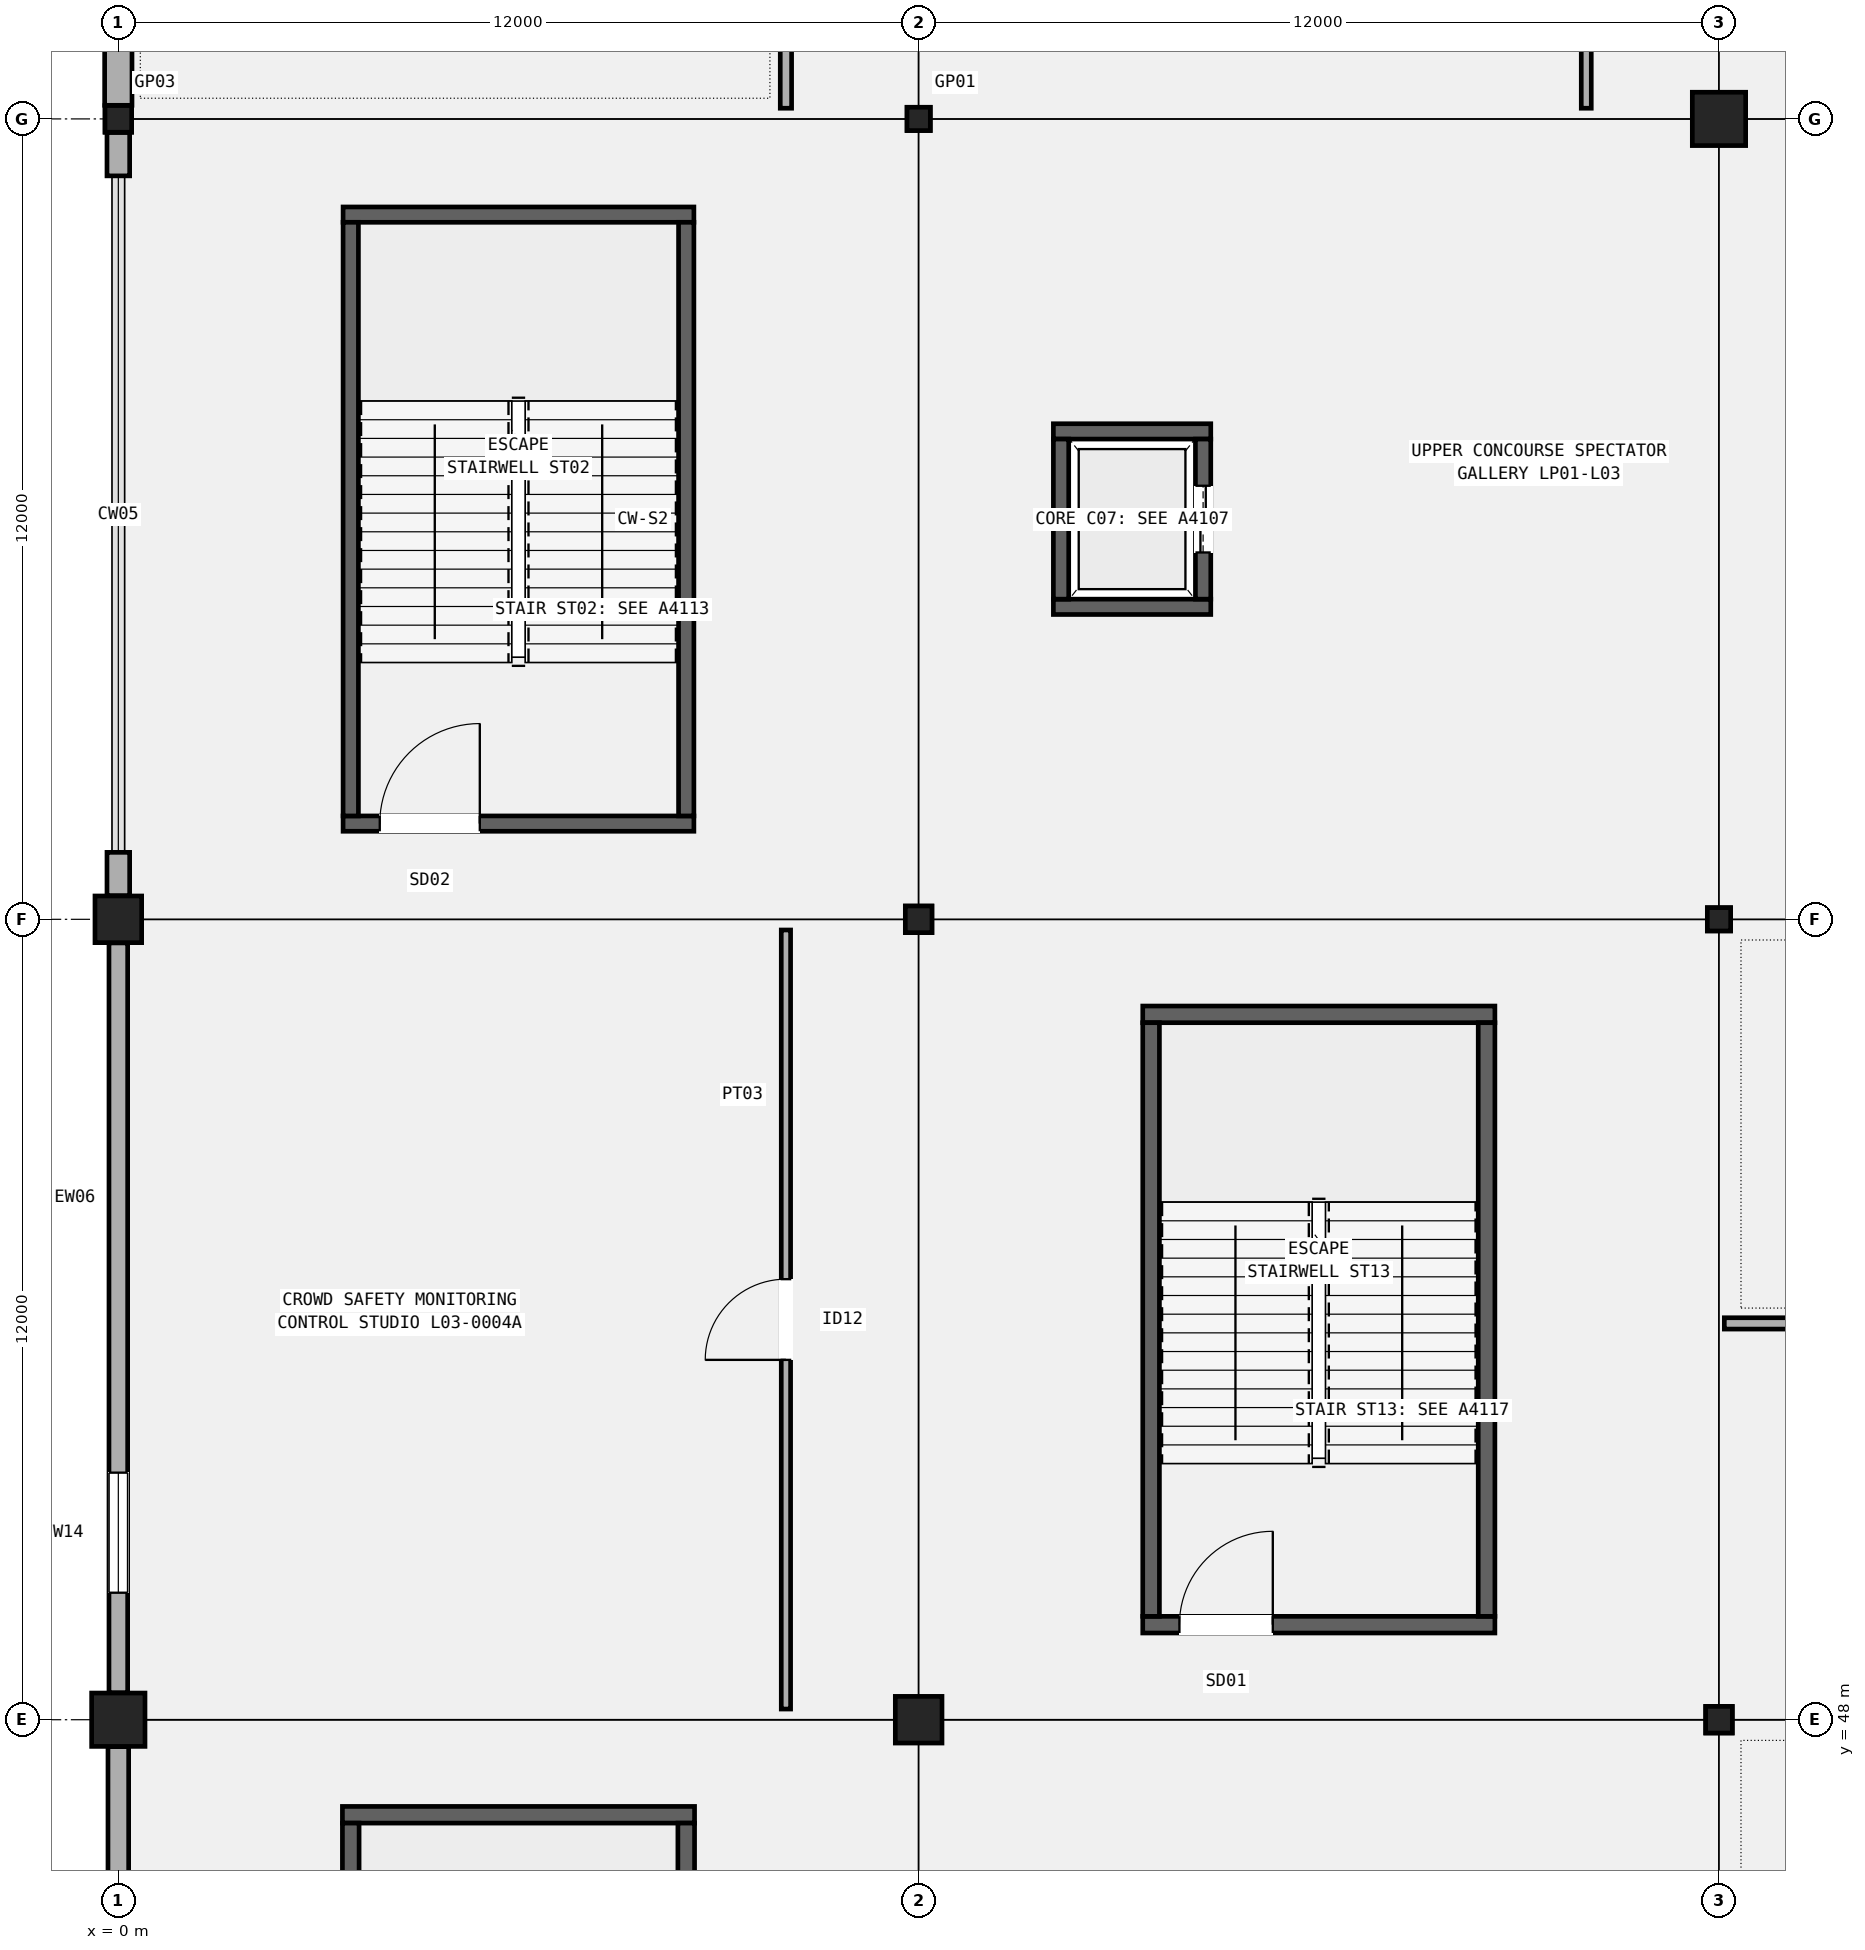
"""IFC4 building model, lengths in metres.
Left out: names, types, materials, properties, quantities, classifications, styles, units other than length and angle.
Written with IfcOpenShell. Run it as: python <this file> out.ifc"""

import sys

from ifc_helpers import new_model, si_unit, direction, frame, frame_2d, origin, origin_2d, place, context, subcontext, project, spatial, rectangle, hollow_rectangle, extrude, element, fill, save


model = new_model("IFC4")
c1 = context("Model", 3, precision=1e-05, world=origin(), true_north=direction((0.0, 1.0)))
c2 = subcontext(c1, "Body", "Model", "MODEL_VIEW")
j1 = project(units=[si_unit("LENGTHUNIT", "METRE"), si_unit("PLANEANGLEUNIT", "RADIAN")], contexts=[c1])
p1 = place(None, origin())
s1 = spatial("IfcSite", under=j1, at=p1, CompositionType="ELEMENT")
p2 = place(p1, origin())
s2 = spatial("IfcBuilding", under=s1, at=p2, CompositionType="ELEMENT")
p3 = place(p2, frame((0.0, 0.0, 15.3)))
s3 = spatial("IfcBuildingStorey", under=s2, at=p3, CompositionType="ELEMENT", Elevation=15.3)
p4 = place(p3, frame((0.0, 48.0, 0.0), z_axis=(0.0, 0.0, 1.0), x_axis=(1.0, 0.0, 0.0)))
e1 = element("IfcColumn", 1, at=p4, inside=s3, PredefinedType="COLUMN", context=c2, shape_type="SweptSolid", body=[
    extrude(rectangle(XDim=0.8, YDim=0.8, at=origin_2d()), origin(), (0.0, 0.0, 1.0), 5.1),
])
p5 = place(p3, frame((0.0, 60.0, 0.0), z_axis=(0.0, 0.0, 1.0), x_axis=(1.0, 0.0, 0.0)))
e2 = element("IfcColumn", 2, at=p5, inside=s3, PredefinedType="COLUMN", context=c2, shape_type="SweptSolid", body=[
    extrude(rectangle(XDim=0.7, YDim=0.7, at=origin_2d()), origin(), (0.0, 0.0, 1.0), 5.1),
])
p6 = place(p3, frame((0.0, 72.0, 0.0), z_axis=(0.0, 0.0, 1.0), x_axis=(1.0, 0.0, 0.0)))
e3 = element("IfcColumn", 3, at=p6, inside=s3, PredefinedType="COLUMN", context=c2, shape_type="SweptSolid", body=[
    extrude(hollow_rectangle(XDim=0.4, YDim=0.4, WallThickness=0.016, InnerFilletRadius=0.016, OuterFilletRadius=0.032, at=origin_2d()), origin(), (0.0, 0.0, 1.0), 5.1),
])
p7 = place(p3, frame((12.0, 48.0, 0.0), z_axis=(0.0, 0.0, 1.0), x_axis=(1.0, 0.0, 0.0)))
e4 = element("IfcColumn", 4, at=p7, inside=s3, PredefinedType="COLUMN", context=c2, shape_type="SweptSolid", body=[
    extrude(rectangle(XDim=0.7, YDim=0.7, at=origin_2d()), origin(), (0.0, 0.0, 1.0), 5.1),
])
p8 = place(p3, frame((12.0, 60.0, 0.0), z_axis=(0.0, 0.0, 1.0), x_axis=(1.0, 0.0, 0.0)))
e5 = element("IfcColumn", 5, at=p8, inside=s3, PredefinedType="COLUMN", context=c2, shape_type="SweptSolid", body=[
    extrude(hollow_rectangle(XDim=0.4, YDim=0.4, WallThickness=0.016, InnerFilletRadius=0.016, OuterFilletRadius=0.032, at=origin_2d()), origin(), (0.0, 0.0, 1.0), 5.1),
])
p9 = place(p3, frame((12.0, 72.0, 0.0), z_axis=(0.0, 0.0, 1.0), x_axis=(1.0, 0.0, 0.0)))
e6 = element("IfcColumn", 6, at=p9, inside=s3, PredefinedType="COLUMN", context=c2, shape_type="SweptSolid", body=[
    extrude(hollow_rectangle(XDim=0.35, YDim=0.35, WallThickness=0.016, InnerFilletRadius=0.016, OuterFilletRadius=0.032, at=origin_2d()), origin(), (0.0, 0.0, 1.0), 5.1),
])
p10 = place(p3, frame((24.0, 48.0, 0.0), z_axis=(0.0, 0.0, 1.0), x_axis=(1.0, 0.0, 0.0)))
e7 = element("IfcColumn", 7, at=p10, inside=s3, PredefinedType="COLUMN", context=c2, shape_type="SweptSolid", body=[
    extrude(hollow_rectangle(XDim=0.4, YDim=0.4, WallThickness=0.016, InnerFilletRadius=0.016, OuterFilletRadius=0.032, at=origin_2d()), origin(), (0.0, 0.0, 1.0), 5.1),
])
p11 = place(p3, frame((24.0, 60.0, 0.0), z_axis=(0.0, 0.0, 1.0), x_axis=(1.0, 0.0, 0.0)))
e8 = element("IfcColumn", 8, at=p11, inside=s3, PredefinedType="COLUMN", context=c2, shape_type="SweptSolid", body=[
    extrude(hollow_rectangle(XDim=0.35, YDim=0.35, WallThickness=0.016, InnerFilletRadius=0.016, OuterFilletRadius=0.032, at=origin_2d()), origin(), (0.0, 0.0, 1.0), 5.1),
])
p12 = place(p3, frame((24.0, 72.0, 0.0), z_axis=(0.0, 0.0, 1.0), x_axis=(1.0, 0.0, 0.0)))
e9 = element("IfcColumn", 9, at=p12, inside=s3, PredefinedType="COLUMN", context=c2, shape_type="SweptSolid", body=[
    extrude(rectangle(XDim=0.8, YDim=0.8, at=origin_2d()), origin(), (0.0, 0.0, 1.0), 5.1),
])
p13 = place(p3, frame((0.0, 36.179, 0.0), z_axis=(0.0, 0.0, 1.0), x_axis=(0.0, 1.0, 0.0)))
e10 = element("IfcWall", 10, at=p13, inside=s3, PredefinedType="SOLIDWALL", context=c2, shape_type="SweptSolid", body=[
    extrude(rectangle(XDim=11.417, YDim=0.31, at=frame_2d((5.708, 0.0))), origin(), (0.0, 0.0, 1.0), 4.06),
])
p14 = place(p13, frame((2.75, 0.0, 0.95)))
e11 = element("IfcOpeningElement", 11, at=p14, cuts=e10, PredefinedType="OPENING", context=c2, shape_type="SweptSolid", body=[
    extrude(rectangle(XDim=1.8, YDim=1.75, at=frame_2d((0.9, 0.875))), frame((0.0, 0.165, 0.0), z_axis=(0.0, -1.0, 0.0), x_axis=(1.0, 0.0, 0.0)), (0.0, 0.0, 1.0), 0.33),
])
p15 = place(p3, frame((0.0, 48.404, 0.0), z_axis=(0.0, 0.0, 1.0), x_axis=(0.0, 1.0, 0.0)))
e12 = element("IfcWall", 12, at=p15, inside=s3, PredefinedType="SOLIDWALL", context=c2, shape_type="SweptSolid", body=[
    extrude(rectangle(XDim=11.242, YDim=0.28, at=frame_2d((5.621, 0.0))), origin(), (0.0, 0.0, 1.0), 4.16),
])
p16 = place(p15, frame((1.5, 0.0, 0.95)))
e13 = element("IfcOpeningElement", 13, at=p16, cuts=e12, PredefinedType="OPENING", context=c2, shape_type="SweptSolid", body=[
    extrude(rectangle(XDim=1.8, YDim=2.15, at=frame_2d((0.9, 1.075))), frame((0.0, 0.15, 0.0), z_axis=(0.0, -1.0, 0.0), x_axis=(1.0, 0.0, 0.0)), (0.0, 0.0, 1.0), 0.3),
])
for number, where, z_axis, x_axis in (
    (14, (0.0, 60.354, 0.0), (0.0, 0.0, 1.0), (0.0, 1.0, 0.0)),
    (15, (0.0, 71.146, 0.0), (0.0, 0.0, 1.0), (0.0, 1.0, 0.0)),
):
    element("IfcWall", number, at=place(p3, frame(where, z_axis=z_axis, x_axis=x_axis)), inside=s3, PredefinedType="SOLIDWALL", context=c2, shape_type="SweptSolid", body=[
        extrude(rectangle(XDim=0.65, YDim=0.34, at=frame_2d((0.325, 0.0))), origin(), (0.0, 0.0, 1.0), 4.172),
    ])
p17 = place(p3, frame((0.0, 72.204, 0.0), z_axis=(0.0, 0.0, 1.0), x_axis=(0.0, 1.0, 0.0)))
e16 = element("IfcWall", 16, at=p17, inside=s3, PredefinedType="SOLIDWALL", context=c2, shape_type="SweptSolid", body=[
    extrude(rectangle(XDim=11.617, YDim=0.41, at=frame_2d((5.809, 0.0))), origin(), (0.0, 0.0, 1.0), 4.06),
])
p18 = place(p17, frame((6.368, 0.0, 0.95)))
e17 = element("IfcOpeningElement", 17, at=p18, cuts=e16, PredefinedType="OPENING", context=c2, shape_type="SweptSolid", body=[
    extrude(rectangle(XDim=1.8, YDim=2.55, at=frame_2d((0.9, 1.275))), frame((0.0, 0.215, 0.0), z_axis=(0.0, -1.0, 0.0), x_axis=(1.0, 0.0, 0.0)), (0.0, 0.0, 1.0), 0.43),
])
p19 = place(p3, frame((3.36, 46.575, 0.0), z_axis=(0.0, 0.0, 1.0), x_axis=(1.0, 0.0, 0.0)))
e18 = element("IfcWall", 18, at=p19, inside=s3, PredefinedType="SHEAR", context=c2, shape_type="SweptSolid", body=[
    extrude(rectangle(XDim=5.28, YDim=0.25, at=frame_2d((2.64, 0.0))), origin(), (0.0, 0.0, 1.0), 4.86),
])
for number, where, z_axis, x_axis in (
    (19, (3.485, 37.55, 0.0), (0.0, 0.0, 1.0), (0.0, 1.0, 0.0)),
    (20, (8.515, 37.55, 0.0), (0.0, 0.0, 1.0), (0.0, 1.0, 0.0)),
):
    element("IfcWall", number, at=place(p3, frame(where, z_axis=z_axis, x_axis=x_axis)), inside=s3, PredefinedType="SHEAR", context=c2, shape_type="SweptSolid", body=[
        extrude(rectangle(XDim=8.9, YDim=0.25, at=frame_2d((4.45, 0.0))), origin(), (0.0, 0.0, 1.0), 4.86),
    ])
p20 = place(p3, frame((3.37, 61.435, 0.0), z_axis=(0.0, 0.0, 1.0), x_axis=(1.0, 0.0, 0.0)))
e21 = element("IfcWall", 21, at=p20, inside=s3, PredefinedType="SHEAR", context=c2, shape_type="SweptSolid", body=[
    extrude(rectangle(XDim=5.26, YDim=0.23, at=frame_2d((2.63, 0.0))), origin(), (0.0, 0.0, 1.0), 4.86),
])
p21 = place(p20, frame((0.55, 0.0, 0.0)))
e22 = element("IfcOpeningElement", 22, at=p21, cuts=e21, PredefinedType="OPENING", context=c2, shape_type="SweptSolid", body=[
    extrude(rectangle(XDim=1.5, YDim=2.2, at=frame_2d((0.75, 1.1))), frame((0.0, 0.125, 0.0), z_axis=(0.0, -1.0, 0.0), x_axis=(1.0, 0.0, 0.0)), (0.0, 0.0, 1.0), 0.25),
])
p22 = place(p3, frame((3.37, 70.565, 0.0), z_axis=(0.0, 0.0, 1.0), x_axis=(1.0, 0.0, 0.0)))
e23 = element("IfcWall", 23, at=p22, inside=s3, PredefinedType="SHEAR", context=c2, shape_type="SweptSolid", body=[
    extrude(rectangle(XDim=5.26, YDim=0.23, at=frame_2d((2.63, 0.0))), origin(), (0.0, 0.0, 1.0), 4.86),
])
for number, where, z_axis, x_axis in (
    (24, (3.485, 61.55, 0.0), (0.0, 0.0, 1.0), (0.0, 1.0, 0.0)),
    (25, (8.515, 61.55, 0.0), (0.0, 0.0, 1.0), (0.0, 1.0, 0.0)),
):
    element("IfcWall", number, at=place(p3, frame(where, z_axis=z_axis, x_axis=x_axis)), inside=s3, PredefinedType="SHEAR", context=c2, shape_type="SweptSolid", body=[
        extrude(rectangle(XDim=8.9, YDim=0.23, at=frame_2d((4.45, 0.0))), origin(), (0.0, 0.0, 1.0), 4.86),
    ])
p23 = place(p3, frame((15.36, 49.425, 0.0), z_axis=(0.0, 0.0, 1.0), x_axis=(1.0, 0.0, 0.0)))
e26 = element("IfcWall", 26, at=p23, inside=s3, PredefinedType="SHEAR", context=c2, shape_type="SweptSolid", body=[
    extrude(rectangle(XDim=5.28, YDim=0.25, at=frame_2d((2.64, 0.0))), origin(), (0.0, 0.0, 1.0), 4.86),
])
p24 = place(p23, frame((0.55, 0.0, 0.0)))
e27 = element("IfcOpeningElement", 27, at=p24, cuts=e26, PredefinedType="OPENING", context=c2, shape_type="SweptSolid", body=[
    extrude(rectangle(XDim=1.4, YDim=2.15, at=frame_2d((0.7, 1.075))), frame((0.0, 0.135, 0.0), z_axis=(0.0, -1.0, 0.0), x_axis=(1.0, 0.0, 0.0)), (0.0, 0.0, 1.0), 0.27),
])
p25 = place(p3, frame((15.36, 58.575, 0.0), z_axis=(0.0, 0.0, 1.0), x_axis=(1.0, 0.0, 0.0)))
e28 = element("IfcWall", 28, at=p25, inside=s3, PredefinedType="SHEAR", context=c2, shape_type="SweptSolid", body=[
    extrude(rectangle(XDim=5.28, YDim=0.25, at=frame_2d((2.64, 0.0))), origin(), (0.0, 0.0, 1.0), 4.86),
])
for number, where, z_axis, x_axis in (
    (29, (15.485, 49.55, 0.0), (0.0, 0.0, 1.0), (0.0, 1.0, 0.0)),
    (30, (20.515, 49.55, 0.0), (0.0, 0.0, 1.0), (0.0, 1.0, 0.0)),
):
    element("IfcWall", number, at=place(p3, frame(where, z_axis=z_axis, x_axis=x_axis)), inside=s3, PredefinedType="SHEAR", context=c2, shape_type="SweptSolid", body=[
        extrude(rectangle(XDim=8.9, YDim=0.25, at=frame_2d((4.45, 0.0))), origin(), (0.0, 0.0, 1.0), 4.86),
    ])
for number, where, z_axis, x_axis in (
    (31, (14.02, 64.685, 0.0), (0.0, 0.0, 1.0), (1.0, 0.0, 0.0)),
    (32, (14.02, 67.315, 0.0), (0.0, 0.0, 1.0), (1.0, 0.0, 0.0)),
):
    element("IfcWall", number, at=place(p3, frame(where, z_axis=z_axis, x_axis=x_axis)), inside=s3, PredefinedType="SHEAR", context=c2, shape_type="SweptSolid", body=[
        extrude(rectangle(XDim=2.36, YDim=0.23, at=frame_2d((1.18, 0.0))), origin(), (0.0, 0.0, 1.0), 4.86),
    ])
p26 = place(p3, frame((14.135, 64.8, 0.0), z_axis=(0.0, 0.0, 1.0), x_axis=(0.0, 1.0, 0.0)))
e33 = element("IfcWall", 33, at=p26, inside=s3, PredefinedType="SHEAR", context=c2, shape_type="SweptSolid", body=[
    extrude(rectangle(XDim=2.4, YDim=0.23, at=frame_2d((1.2, 0.0))), origin(), (0.0, 0.0, 1.0), 4.86),
])
p27 = place(p3, frame((16.265, 64.8, 0.0), z_axis=(0.0, 0.0, 1.0), x_axis=(0.0, 1.0, 0.0)))
e34 = element("IfcWall", 34, at=p27, inside=s3, PredefinedType="SHEAR", context=c2, shape_type="SweptSolid", body=[
    extrude(rectangle(XDim=2.4, YDim=0.23, at=frame_2d((1.2, 0.0))), origin(), (0.0, 0.0, 1.0), 4.86),
])
p28 = place(p27, frame((0.7, 0.0, 0.0)))
e35 = element("IfcOpeningElement", 35, at=p28, cuts=e34, PredefinedType="OPENING", context=c2, shape_type="SweptSolid", body=[
    extrude(rectangle(XDim=1.0, YDim=2.15, at=frame_2d((0.5, 1.075))), frame((0.0, 0.125, 0.0), z_axis=(0.0, -1.0, 0.0), x_axis=(1.0, 0.0, 0.0)), (0.0, 0.0, 1.0), 0.25),
])
p29 = place(p3, frame((10.01, 48.16, 0.0), z_axis=(0.0, 0.0, 1.0), x_axis=(0.0, 1.0, 0.0)))
e36 = element("IfcWall", 36, at=p29, inside=s3, PredefinedType="PARTITIONING", context=c2, shape_type="SweptSolid", body=[
    extrude(rectangle(XDim=11.68, YDim=0.14, at=frame_2d((5.84, 0.0))), origin(), (0.0, 0.0, 1.0), 4.22),
])
p30 = place(p29, frame((5.235, 0.0, 0.0)))
e37 = element("IfcOpeningElement", 37, at=p30, cuts=e36, PredefinedType="OPENING", context=c2, shape_type="SweptSolid", body=[
    extrude(rectangle(XDim=1.21, YDim=2.18, at=frame_2d((0.605, 1.09))), frame((0.0, 0.08, 0.0), z_axis=(0.0, -1.0, 0.0), x_axis=(1.0, 0.0, 0.0)), (0.0, 0.0, 1.0), 0.16),
])
p31 = place(p3, frame((10.01, 72.16, 0.0), z_axis=(0.0, 0.0, 1.0), x_axis=(0.0, 1.0, 0.0)))
e38 = element("IfcWall", 38, at=p31, inside=s3, PredefinedType="PARTITIONING", context=c2, shape_type="SweptSolid", body=[
    extrude(rectangle(XDim=11.68, YDim=0.17, at=frame_2d((5.84, 0.0))), origin(), (0.0, 0.0, 1.0), 4.22),
])
p32 = place(p31, frame((2.231, 0.0, 0.0)))
e39 = element("IfcOpeningElement", 39, at=p32, cuts=e38, PredefinedType="OPENING", context=c2, shape_type="SweptSolid", body=[
    extrude(rectangle(XDim=1.24, YDim=2.22, at=frame_2d((0.62, 1.11))), frame((0.0, 0.095, 0.0), z_axis=(0.0, -1.0, 0.0), x_axis=(1.0, 0.0, 0.0)), (0.0, 0.0, 1.0), 0.19),
])
p33 = place(p31, frame((8.136, 0.0, 0.0)))
e40 = element("IfcOpeningElement", 40, at=p33, cuts=e38, PredefinedType="OPENING", context=c2, shape_type="SweptSolid", body=[
    extrude(rectangle(XDim=1.27, YDim=2.2, at=frame_2d((0.635, 1.1))), frame((0.0, 0.095, 0.0), z_axis=(0.0, -1.0, 0.0), x_axis=(1.0, 0.0, 0.0)), (0.0, 0.0, 1.0), 0.19),
])
p34 = place(p3, frame((22.01, 72.16, 0.0), z_axis=(0.0, 0.0, 1.0), x_axis=(0.0, 1.0, 0.0)))
e41 = element("IfcWall", 41, at=p34, inside=s3, PredefinedType="PARTITIONING", context=c2, shape_type="SweptSolid", body=[
    extrude(rectangle(XDim=11.68, YDim=0.15, at=frame_2d((5.84, 0.0))), origin(), (0.0, 0.0, 1.0), 4.22),
])
p35 = place(p34, frame((5.12, 0.0, 0.0)))
e42 = element("IfcOpeningElement", 42, at=p35, cuts=e41, PredefinedType="OPENING", context=c2, shape_type="SweptSolid", body=[
    extrude(rectangle(XDim=1.44, YDim=2.26, at=frame_2d((0.72, 1.13))), frame((0.0, 0.085, 0.0), z_axis=(0.0, -1.0, 0.0), x_axis=(1.0, 0.0, 0.0)), (0.0, 0.0, 1.0), 0.17),
])
p36 = place(p3, frame((24.08, 53.942, 0.0), z_axis=(0.0, 0.0, 1.0), x_axis=(1.0, 0.0, 0.0)))
e43 = element("IfcWall", 43, at=p36, inside=s3, PredefinedType="PARTITIONING", context=c2, shape_type="SweptSolid", body=[
    extrude(rectangle(XDim=10.35, YDim=0.17, at=frame_2d((5.175, 0.0))), origin(), (0.0, 0.0, 1.0), 4.22),
])
p37 = place(p16, origin())
e44 = element("IfcWindow", 44, at=p37, inside=s3, PartitioningType="SINGLE_PANEL", PredefinedType="WINDOW", context=c2, shape_type="SweptSolid", body=[
    extrude(rectangle(XDim=1.8, YDim=2.15, at=frame_2d((0.9, 1.075))), frame((0.0, 0.03, 0.0), z_axis=(0.0, -1.0, 0.0), x_axis=(1.0, 0.0, 0.0)), (0.0, 0.0, 1.0), 0.06),
])
fill(e13, e44)
p38 = place(p21, origin())
e45 = element("IfcDoor", 45, at=p38, inside=s3, OperationType="SINGLE_SWING_RIGHT", PredefinedType="DOOR", context=c2, shape_type="SweptSolid", body=[
    extrude(rectangle(XDim=1.5, YDim=2.2, at=frame_2d((0.75, 1.1))), frame((0.0, 0.025, 0.0), z_axis=(0.0, -1.0, 0.0), x_axis=(1.0, 0.0, 0.0)), (0.0, 0.0, 1.0), 0.05),
])
fill(e22, e45)
p39 = place(p24, origin())
e46 = element("IfcDoor", 46, at=p39, inside=s3, OperationType="SINGLE_SWING_RIGHT", PredefinedType="DOOR", context=c2, shape_type="SweptSolid", body=[
    extrude(rectangle(XDim=1.4, YDim=2.15, at=frame_2d((0.7, 1.075))), frame((0.0, 0.025, 0.0), z_axis=(0.0, -1.0, 0.0), x_axis=(1.0, 0.0, 0.0)), (0.0, 0.0, 1.0), 0.05),
])
fill(e27, e46)
p40 = place(p28, origin())
e47 = element("IfcDoor", 47, at=p40, inside=s3, OperationType="DOUBLE_DOOR_SLIDING", PredefinedType="DOOR", context=c2, shape_type="SweptSolid", body=[
    extrude(rectangle(XDim=1.0, YDim=2.15, at=frame_2d((0.5, 1.075))), frame((0.0, 0.025, 0.0), z_axis=(0.0, -1.0, 0.0), x_axis=(1.0, 0.0, 0.0)), (0.0, 0.0, 1.0), 0.05),
])
fill(e35, e47)
p41 = place(p30, origin())
e48 = element("IfcDoor", 48, at=p41, inside=s3, OperationType="SINGLE_SWING_LEFT", PredefinedType="DOOR", context=c2, shape_type="SweptSolid", body=[
    extrude(rectangle(XDim=1.21, YDim=2.18, at=frame_2d((0.605, 1.09))), frame((0.0, 0.025, 0.0), z_axis=(0.0, -1.0, 0.0), x_axis=(1.0, 0.0, 0.0)), (0.0, 0.0, 1.0), 0.05),
])
fill(e37, e48)
save(model, sys.argv[1])
